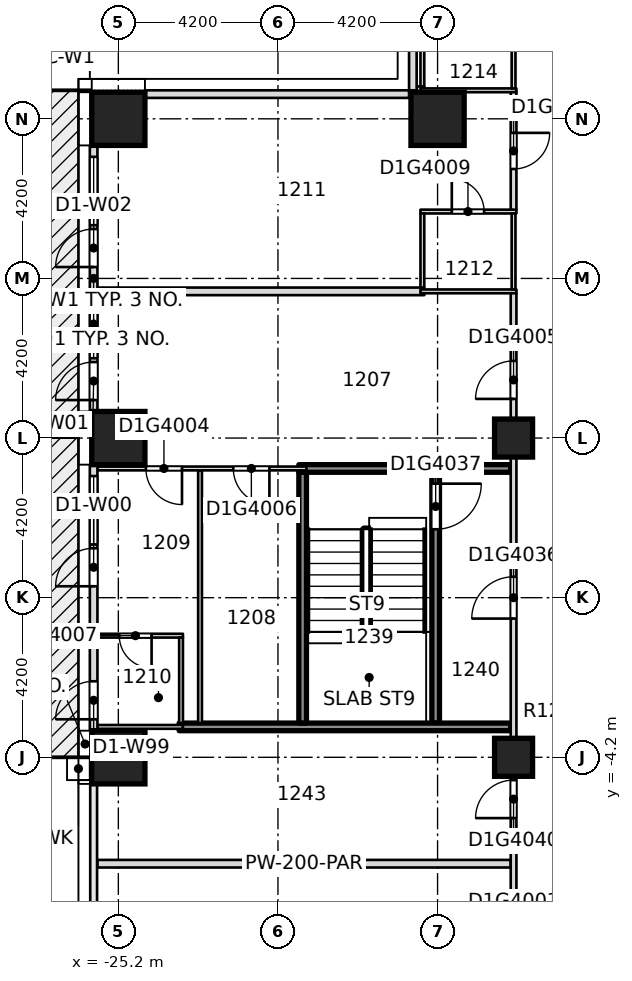
"""IFC4 building model, lengths in metres.
Left out: names, types, materials, properties, quantities, classifications, styles, units other than length and angle.
Written with IfcOpenShell. Run it as: python <this file> out.ifc"""

import sys

from ifc_helpers import new_model, si_unit, direction, frame, frame_2d, origin, origin_2d, place, context, subcontext, project, spatial, rectangle, extrude, element, fill, save


model = new_model("IFC4")
c1 = context("Model", 3, precision=1e-05, world=origin(), true_north=direction((0.0, 1.0)))
c2 = subcontext(c1, "Body", "Model", "MODEL_VIEW")
j1 = project(units=[si_unit("LENGTHUNIT", "METRE"), si_unit("PLANEANGLEUNIT", "RADIAN")], contexts=[c1])
p1 = place(None, origin())
s1 = spatial("IfcSite", under=j1, at=p1, CompositionType="ELEMENT")
p2 = place(p1, origin())
s2 = spatial("IfcBuilding", under=s1, at=p2, CompositionType="ELEMENT")
p3 = place(p2, frame((0.0, 0.0, 55.2)))
s3 = spatial("IfcBuildingStorey", under=s2, at=p3, CompositionType="ELEMENT", Elevation=55.2)
for number, where, z_axis, x_axis in (
    (1, (-25.2, -4.2, -0.32), (0.0, 0.0, 1.0), (1.0, 0.0, 0.0)),
    (2, (-25.2, 4.2, -0.32), (0.0, 0.0, 1.0), (1.0, 0.0, 0.0)),
    (3, (-25.2, 12.6, -0.32), (0.0, 0.0, 1.0), (1.0, 0.0, 0.0)),
    (4, (-16.8, 12.6, -0.32), (0.0, 0.0, 1.0), (1.0, 0.0, 0.0)),
):
    element("IfcColumn", number, at=place(p3, frame(where, z_axis=z_axis, x_axis=x_axis)), inside=s3, PredefinedType="COLUMN", context=c2, shape_type="SweptSolid", body=[
        extrude(rectangle(XDim=1.4, YDim=1.4, at=origin_2d()), origin(), (0.0, 0.0, 1.0), 3.45),
    ])
for number, where, z_axis, x_axis in (
    (5, (-14.8, -4.2, -0.32), (0.0, 0.0, 1.0), (1.0, 0.0, 0.0)),
    (6, (-14.8, 4.2, -0.32), (0.0, 0.0, 1.0), (1.0, 0.0, 0.0)),
):
    element("IfcColumn", number, at=place(p3, frame(where, z_axis=z_axis, x_axis=x_axis)), inside=s3, PredefinedType="COLUMN", context=c2, shape_type="SweptSolid", body=[
        extrude(rectangle(XDim=1.0, YDim=1.0, at=origin_2d()), origin(), (0.0, 0.0, 1.0), 3.45),
    ])
p4 = place(p3, frame((-25.75, -7.0, 0.0), z_axis=(0.0, 0.0, 1.0), x_axis=(1.0, 0.0, 0.0)))
e7 = element("IfcWall", 7, at=p4, inside=s3, PredefinedType="PARTITIONING", context=c2, shape_type="SweptSolid", body=[
    extrude(rectangle(XDim=10.875, YDim=0.2, at=frame_2d((5.438, 0.0))), origin(), (0.0, 0.0, 1.0), 3.13),
])
p5 = place(p3, frame((-25.75, -3.4, 0.0), z_axis=(0.0, 0.0, 1.0), x_axis=(1.0, 0.0, 0.0)))
e8 = element("IfcWall", 8, at=p5, inside=s3, PredefinedType="PARTITIONING", context=c2, shape_type="SweptSolid", body=[
    extrude(rectangle(XDim=2.25, YDim=0.1, at=frame_2d((1.125, 0.0))), origin(), (0.0, 0.0, 1.0), 3.13),
])
p6 = place(p3, frame((-25.75, -1.0, 0.0), z_axis=(0.0, 0.0, 1.0), x_axis=(1.0, 0.0, 0.0)))
e9 = element("IfcWall", 9, at=p6, inside=s3, PredefinedType="PARTITIONING", context=c2, shape_type="SweptSolid", body=[
    extrude(rectangle(XDim=2.25, YDim=0.1, at=frame_2d((1.125, 0.0))), origin(), (0.0, 0.0, 1.0), 3.13),
])
p7 = place(p6, frame((0.575, 0.0, 0.0)))
e10 = element("IfcOpeningElement", 10, at=p7, cuts=e9, PredefinedType="OPENING", context=c2, shape_type="SweptSolid", body=[
    extrude(rectangle(XDim=0.85, YDim=2.1, at=frame_2d((0.425, 1.05))), frame((0.0, 0.06, 0.0), z_axis=(0.0, -1.0, 0.0), x_axis=(1.0, 0.0, 0.0)), (0.0, 0.0, 1.0), 0.12),
])
p8 = place(p3, frame((-25.75, 3.4, 0.0), z_axis=(0.0, 0.0, 1.0), x_axis=(1.0, 0.0, 0.0)))
e11 = element("IfcWall", 11, at=p8, inside=s3, PredefinedType="PARTITIONING", context=c2, shape_type="SweptSolid", body=[
    extrude(rectangle(XDim=5.5, YDim=0.1, at=frame_2d((2.75, 0.0))), origin(), (0.0, 0.0, 1.0), 3.13),
])
p9 = place(p8, frame((1.275, 0.0, 0.0)))
e12 = element("IfcOpeningElement", 12, at=p9, cuts=e11, PredefinedType="OPENING", context=c2, shape_type="SweptSolid", body=[
    extrude(rectangle(XDim=0.95, YDim=2.1, at=frame_2d((0.475, 1.05))), frame((0.0, 0.06, 0.0), z_axis=(0.0, -1.0, 0.0), x_axis=(1.0, 0.0, 0.0)), (0.0, 0.0, 1.0), 0.12),
])
p10 = place(p8, frame((3.575, 0.0, 0.0)))
e13 = element("IfcOpeningElement", 13, at=p10, cuts=e11, PredefinedType="OPENING", context=c2, shape_type="SweptSolid", body=[
    extrude(rectangle(XDim=0.95, YDim=2.1, at=frame_2d((0.475, 1.05))), frame((0.0, 0.06, 0.0), z_axis=(0.0, -1.0, 0.0), x_axis=(1.0, 0.0, 0.0)), (0.0, 0.0, 1.0), 0.12),
])
p11 = place(p3, frame((-20.45, 3.4, 0.0), z_axis=(0.0, 0.0, 1.0), x_axis=(1.0, 0.0, 0.0)))
e14 = element("IfcWall", 14, at=p11, inside=s3, PredefinedType="SOLIDWALL", context=c2, shape_type="SweptSolid", body=[
    extrude(rectangle(XDim=5.575, YDim=0.2, at=frame_2d((2.788, 0.0))), origin(), (0.0, 0.0, 1.0), 3.13),
])
p12 = place(p3, frame((-25.75, 8.06, 0.0), z_axis=(0.0, 0.0, 1.0), x_axis=(1.0, 0.0, 0.0)))
e15 = element("IfcWall", 15, at=p12, inside=s3, PredefinedType="PARTITIONING", context=c2, shape_type="SweptSolid", body=[
    extrude(rectangle(XDim=8.6, YDim=0.2, at=frame_2d((4.3, 0.0))), origin(), (0.0, 0.0, 1.0), 3.13),
])
p13 = place(p3, frame((-17.25, 8.06, 0.0), z_axis=(0.0, 0.0, 1.0), x_axis=(1.0, 0.0, 0.0)))
e16 = element("IfcWall", 16, at=p13, inside=s3, PredefinedType="PARTITIONING", context=c2, shape_type="SweptSolid", body=[
    extrude(rectangle(XDim=2.525, YDim=0.1, at=frame_2d((1.262, 0.0))), origin(), (0.0, 0.0, 1.0), 3.13),
])
p14 = place(p3, frame((-17.25, 10.16, 0.0), z_axis=(0.0, 0.0, 1.0), x_axis=(1.0, 0.0, 0.0)))
e17 = element("IfcWall", 17, at=p14, inside=s3, PredefinedType="PARTITIONING", context=c2, shape_type="SweptSolid", body=[
    extrude(rectangle(XDim=2.525, YDim=0.1, at=frame_2d((1.262, 0.0))), origin(), (0.0, 0.0, 1.0), 3.13),
])
p15 = place(p14, frame((0.825, 0.0, 0.0)))
e18 = element("IfcOpeningElement", 18, at=p15, cuts=e17, PredefinedType="OPENING", context=c2, shape_type="SweptSolid", body=[
    extrude(rectangle(XDim=0.85, YDim=2.1, at=frame_2d((0.425, 1.05))), frame((0.0, 0.06, 0.0), z_axis=(0.0, -1.0, 0.0), x_axis=(1.0, 0.0, 0.0)), (0.0, 0.0, 1.0), 0.12),
])
p16 = place(p3, frame((-17.35, 13.35, 0.0), z_axis=(0.0, 0.0, 1.0), x_axis=(1.0, 0.0, 0.0)))
e19 = element("IfcWall", 19, at=p16, inside=s3, PredefinedType="PARTITIONING", context=c2, shape_type="SweptSolid", body=[
    extrude(rectangle(XDim=0.2, YDim=0.2, at=frame_2d((0.1, 0.0))), origin(), (0.0, 0.0, 1.0), 3.13),
])
p17 = place(p3, frame((-17.25, 13.35, 0.0), z_axis=(0.0, 0.0, 1.0), x_axis=(1.0, 0.0, 0.0)))
e20 = element("IfcWall", 20, at=p17, inside=s3, PredefinedType="PARTITIONING", context=c2, shape_type="SweptSolid", body=[
    extrude(rectangle(XDim=2.525, YDim=0.1, at=frame_2d((1.262, 0.0))), origin(), (0.0, 0.0, 1.0), 3.13),
])
p18 = place(p3, frame((-23.55, -3.3, 0.0), z_axis=(0.0, 0.0, 1.0), x_axis=(0.0, 1.0, 0.0)))
e21 = element("IfcWall", 21, at=p18, inside=s3, PredefinedType="PARTITIONING", context=c2, shape_type="SweptSolid", body=[
    extrude(rectangle(XDim=2.25, YDim=0.1, at=frame_2d((1.125, 0.0))), origin(), (0.0, 0.0, 1.0), 3.13),
])
p19 = place(p3, frame((-23.05, -3.3, 0.0), z_axis=(0.0, 0.0, 1.0), x_axis=(0.0, 1.0, 0.0)))
e22 = element("IfcWall", 22, at=p19, inside=s3, PredefinedType="PARTITIONING", context=c2, shape_type="SweptSolid", body=[
    extrude(rectangle(XDim=6.65, YDim=0.1, at=frame_2d((3.325, 0.0))), origin(), (0.0, 0.0, 1.0), 3.13),
])
p20 = place(p3, frame((-17.2, 8.16, 0.0), z_axis=(0.0, 0.0, 1.0), x_axis=(0.0, 1.0, 0.0)))
e23 = element("IfcWall", 23, at=p20, inside=s3, PredefinedType="PARTITIONING", context=c2, shape_type="SweptSolid", body=[
    extrude(rectangle(XDim=1.95, YDim=0.1, at=frame_2d((0.975, 0.0))), origin(), (0.0, 0.0, 1.0), 3.13),
])
p21 = place(p3, frame((-17.2, 13.45, 0.0), z_axis=(0.0, 0.0, 1.0), x_axis=(0.0, 1.0, 0.0)))
e24 = element("IfcWall", 24, at=p21, inside=s3, PredefinedType="PARTITIONING", context=c2, shape_type="SweptSolid", body=[
    extrude(rectangle(XDim=1.65, YDim=0.1, at=frame_2d((0.825, 0.0))), origin(), (0.0, 0.0, 1.0), 3.13),
])
p22 = place(p3, frame((-16.85, -3.3, 0.0), z_axis=(0.0, 0.0, 1.0), x_axis=(0.0, 1.0, 0.0)))
e25 = element("IfcWall", 25, at=p22, inside=s3, PredefinedType="SOLIDWALL", context=c2, shape_type="SweptSolid", body=[
    extrude(rectangle(XDim=6.6, YDim=0.2, at=frame_2d((3.3, 0.0))), origin(), (0.0, 0.0, 1.0), 3.13),
])
p23 = place(p22, frame((5.1, 0.0, 0.0)))
e26 = element("IfcOpeningElement", 26, at=p23, cuts=e25, PredefinedType="OPENING", context=c2, shape_type="SweptSolid", body=[
    extrude(rectangle(XDim=1.2, YDim=2.1, at=frame_2d((0.6, 1.05))), frame((0.0, 0.11, 0.0), z_axis=(0.0, -1.0, 0.0), x_axis=(1.0, 0.0, 0.0)), (0.0, 0.0, 1.0), 0.22),
])
p24 = place(p3, frame((-14.8, -10.525, 0.0), z_axis=(0.0, 0.0, 1.0), x_axis=(0.0, 1.0, 0.0)))
e27 = element("IfcWall", 27, at=p24, inside=s3, PredefinedType="PARTITIONING", context=c2, shape_type="SweptSolid", body=[
    extrude(rectangle(XDim=18.535, YDim=0.15, at=frame_2d((9.268, 0.0))), origin(), (0.0, 0.0, 1.0), 3.13),
])
p25 = place(p24, frame((0.925, 0.0, 0.0)))
e28 = element("IfcOpeningElement", 28, at=p25, cuts=e27, PredefinedType="OPENING", context=c2, shape_type="SweptSolid", body=[
    extrude(rectangle(XDim=1.0, YDim=2.1, at=frame_2d((0.5, 1.05))), frame((0.0, 0.085, 0.0), z_axis=(0.0, -1.0, 0.0), x_axis=(1.0, 0.0, 0.0)), (0.0, 0.0, 1.0), 0.17),
])
p26 = place(p24, frame((15.755, 0.0, 0.0)))
e29 = element("IfcOpeningElement", 29, at=p26, cuts=e27, PredefinedType="OPENING", context=c2, shape_type="SweptSolid", body=[
    extrude(rectangle(XDim=1.0, YDim=2.1, at=frame_2d((0.5, 1.05))), frame((0.0, 0.085, 0.0), z_axis=(0.0, -1.0, 0.0), x_axis=(1.0, 0.0, 0.0)), (0.0, 0.0, 1.0), 0.17),
])
p27 = place(p24, frame((9.975, 0.0, 0.0)))
e30 = element("IfcOpeningElement", 30, at=p27, cuts=e27, PredefinedType="OPENING", context=c2, shape_type="SweptSolid", body=[
    extrude(rectangle(XDim=1.1, YDim=2.1, at=frame_2d((0.55, 1.05))), frame((0.0, 0.085, 0.0), z_axis=(0.0, -1.0, 0.0), x_axis=(1.0, 0.0, 0.0)), (0.0, 0.0, 1.0), 0.17),
])
p28 = place(p24, frame((4.725, 0.0, 0.0)))
e31 = element("IfcOpeningElement", 31, at=p28, cuts=e27, PredefinedType="OPENING", context=c2, shape_type="SweptSolid", body=[
    extrude(rectangle(XDim=1.0, YDim=2.1, at=frame_2d((0.5, 1.05))), frame((0.0, 0.085, 0.0), z_axis=(0.0, -1.0, 0.0), x_axis=(1.0, 0.0, 0.0)), (0.0, 0.0, 1.0), 0.17),
])
p29 = place(p3, frame((-14.8, 8.11, 0.0), z_axis=(0.0, 0.0, 1.0), x_axis=(0.0, 1.0, 0.0)))
e32 = element("IfcWall", 32, at=p29, inside=s3, PredefinedType="PARTITIONING", context=c2, shape_type="SweptSolid", body=[
    extrude(rectangle(XDim=2.0, YDim=0.1, at=frame_2d((1.0, 0.0))), origin(), (0.0, 0.0, 1.0), 3.13),
])
p30 = place(p3, frame((-14.8, 10.21, 0.0), z_axis=(0.0, 0.0, 1.0), x_axis=(0.0, 1.0, 0.0)))
e33 = element("IfcWall", 33, at=p30, inside=s3, PredefinedType="PARTITIONING", context=c2, shape_type="SweptSolid", body=[
    extrude(rectangle(XDim=3.09, YDim=0.15, at=frame_2d((1.545, 0.0))), origin(), (0.0, 0.0, 1.0), 3.13),
])
p31 = place(p30, frame((1.07, 0.0, 0.0)))
e34 = element("IfcOpeningElement", 34, at=p31, cuts=e33, PredefinedType="OPENING", context=c2, shape_type="SweptSolid", body=[
    extrude(rectangle(XDim=0.95, YDim=2.1, at=frame_2d((0.475, 1.05))), frame((0.0, 0.085, 0.0), z_axis=(0.0, -1.0, 0.0), x_axis=(1.0, 0.0, 0.0)), (0.0, 0.0, 1.0), 0.17),
])
p32 = place(p3, frame((-14.8, 13.4, 0.0), z_axis=(0.0, 0.0, 1.0), x_axis=(0.0, 1.0, 0.0)))
e35 = element("IfcWall", 35, at=p32, inside=s3, PredefinedType="PARTITIONING", context=c2, shape_type="SweptSolid", body=[
    extrude(rectangle(XDim=1.7, YDim=0.1, at=frame_2d((0.85, 0.0))), origin(), (0.0, 0.0, 1.0), 3.13),
])
p33 = place(p3, frame((-17.45, 20.3, 0.0), z_axis=(0.0, 0.0, 1.0), x_axis=(0.0, -1.0, 0.0)))
e36 = element("IfcWall", 36, at=p33, inside=s3, PredefinedType="STANDARD", context=c2, shape_type="SweptSolid", body=[
    extrude(rectangle(XDim=6.95, YDim=0.2, at=frame_2d((3.475, 0.0))), origin(), (0.0, 0.0, 1.0), 3.13),
])
p34 = place(p33, frame((3.775, 0.0, 0.2)))
e37 = element("IfcOpeningElement", 37, at=p34, cuts=e36, PredefinedType="OPENING", context=c2, shape_type="SweptSolid", body=[
    extrude(rectangle(XDim=1.8, YDim=2.65, at=frame_2d((0.9, 1.325))), frame((0.0, 0.11, 0.0), z_axis=(0.0, -1.0, 0.0), x_axis=(1.0, 0.0, 0.0)), (0.0, 0.0, 1.0), 0.22),
])
p35 = place(p33, frame((0.3, 0.0, 0.2)))
e38 = element("IfcOpeningElement", 38, at=p35, cuts=e36, PredefinedType="OPENING", context=c2, shape_type="SweptSolid", body=[
    extrude(rectangle(XDim=1.8, YDim=2.65, at=frame_2d((0.9, 1.325))), frame((0.0, 0.11, 0.0), z_axis=(0.0, -1.0, 0.0), x_axis=(1.0, 0.0, 0.0)), (0.0, 0.0, 1.0), 0.22),
])
p36 = place(p3, frame((-17.55, 13.25, 0.0), z_axis=(0.0, 0.0, 1.0), x_axis=(-1.0, 0.0, 0.0)))
e39 = element("IfcWall", 39, at=p36, inside=s3, PredefinedType="STANDARD", context=c2, shape_type="SweptSolid", body=[
    extrude(rectangle(XDim=6.95, YDim=0.2, at=frame_2d((3.475, 0.0))), origin(), (0.0, 0.0, 1.0), 3.13),
])
p37 = place(p3, frame((-25.85, 11.9, 0.0), z_axis=(0.0, 0.0, 1.0), x_axis=(0.0, -1.0, 0.0)))
e40 = element("IfcWall", 40, at=p37, inside=s3, PredefinedType="STANDARD", context=c2, shape_type="SweptSolid", body=[
    extrude(rectangle(XDim=7.0, YDim=0.2, at=frame_2d((3.5, 0.0))), origin(), (0.0, 0.0, 1.0), 3.13),
])
p38 = place(p37, frame((3.8, 0.0, 0.2)))
e41 = element("IfcOpeningElement", 41, at=p38, cuts=e40, PredefinedType="OPENING", context=c2, shape_type="SweptSolid", body=[
    extrude(rectangle(XDim=1.8, YDim=2.65, at=frame_2d((0.9, 1.325))), frame((0.0, 0.11, 0.0), z_axis=(0.0, -1.0, 0.0), x_axis=(1.0, 0.0, 0.0)), (0.0, 0.0, 1.0), 0.22),
])
p39 = place(p37, frame((5.7, 0.0, 0.0)))
e42 = element("IfcOpeningElement", 42, at=p39, cuts=e40, PredefinedType="OPENING", context=c2, shape_type="SweptSolid", body=[
    extrude(rectangle(XDim=1.0, YDim=2.4, at=frame_2d((0.5, 1.2))), frame((0.0, 0.11, 0.0), z_axis=(0.0, -1.0, 0.0), x_axis=(1.0, 0.0, 0.0)), (0.0, 0.0, 1.0), 0.22),
])
p40 = place(p37, frame((0.3, 0.0, 0.2)))
e43 = element("IfcOpeningElement", 43, at=p40, cuts=e40, PredefinedType="OPENING", context=c2, shape_type="SweptSolid", body=[
    extrude(rectangle(XDim=1.8, YDim=2.65, at=frame_2d((0.9, 1.325))), frame((0.0, 0.11, 0.0), z_axis=(0.0, -1.0, 0.0), x_axis=(1.0, 0.0, 0.0)), (0.0, 0.0, 1.0), 0.22),
])
p41 = place(p37, frame((2.2, 0.0, 0.0)))
e44 = element("IfcOpeningElement", 44, at=p41, cuts=e40, PredefinedType="OPENING", context=c2, shape_type="SweptSolid", body=[
    extrude(rectangle(XDim=1.0, YDim=2.4, at=frame_2d((0.5, 1.2))), frame((0.0, 0.11, 0.0), z_axis=(0.0, -1.0, 0.0), x_axis=(1.0, 0.0, 0.0)), (0.0, 0.0, 1.0), 0.22),
])
p42 = place(p3, frame((-25.85, 3.5, 0.0), z_axis=(0.0, 0.0, 1.0), x_axis=(0.0, -1.0, 0.0)))
e45 = element("IfcWall", 45, at=p42, inside=s3, PredefinedType="STANDARD", context=c2, shape_type="SweptSolid", body=[
    extrude(rectangle(XDim=7.0, YDim=0.2, at=frame_2d((3.5, 0.0))), origin(), (0.0, 0.0, 1.0), 3.13),
])
p43 = place(p42, frame((5.7, 0.0, 0.0)))
e46 = element("IfcOpeningElement", 46, at=p43, cuts=e45, PredefinedType="OPENING", context=c2, shape_type="SweptSolid", body=[
    extrude(rectangle(XDim=1.0, YDim=2.4, at=frame_2d((0.5, 1.2))), frame((0.0, 0.11, 0.0), z_axis=(0.0, -1.0, 0.0), x_axis=(1.0, 0.0, 0.0)), (0.0, 0.0, 1.0), 0.22),
])
p44 = place(p42, frame((0.3, 0.0, 0.2)))
e47 = element("IfcOpeningElement", 47, at=p44, cuts=e45, PredefinedType="OPENING", context=c2, shape_type="SweptSolid", body=[
    extrude(rectangle(XDim=1.8, YDim=2.65, at=frame_2d((0.9, 1.325))), frame((0.0, 0.11, 0.0), z_axis=(0.0, -1.0, 0.0), x_axis=(1.0, 0.0, 0.0)), (0.0, 0.0, 1.0), 0.22),
])
p45 = place(p42, frame((2.2, 0.0, 0.0)))
e48 = element("IfcOpeningElement", 48, at=p45, cuts=e45, PredefinedType="OPENING", context=c2, shape_type="SweptSolid", body=[
    extrude(rectangle(XDim=1.0, YDim=2.4, at=frame_2d((0.5, 1.2))), frame((0.0, 0.11, 0.0), z_axis=(0.0, -1.0, 0.0), x_axis=(1.0, 0.0, 0.0)), (0.0, 0.0, 1.0), 0.22),
])
p46 = place(p3, frame((-23.6, -3.4, 0.0), z_axis=(0.0, 0.0, 1.0), x_axis=(1.0, 0.0, 0.0)))
e49 = element("IfcWall", 49, at=p46, inside=s3, PredefinedType="SOLIDWALL", context=c2, shape_type="SweptSolid", body=[
    extrude(rectangle(XDim=8.725, YDim=0.2, at=frame_2d((4.363, 0.0))), origin(), (0.0, 0.0, 1.0), 3.13),
])
p47 = place(p3, frame((-20.35, -3.3, 0.0), z_axis=(0.0, 0.0, 1.0), x_axis=(0.0, 1.0, 0.0)))
e50 = element("IfcWall", 50, at=p47, inside=s3, PredefinedType="SOLIDWALL", context=c2, shape_type="SweptSolid", body=[
    extrude(rectangle(XDim=6.6, YDim=0.2, at=frame_2d((3.3, 0.0))), origin(), (0.0, 0.0, 1.0), 3.13),
])
p48 = place(p9, origin())
e51 = element("IfcDoor", 51, at=p48, inside=s3, OperationType="SINGLE_SWING_RIGHT", PredefinedType="DOOR", context=c2, shape_type="SweptSolid", body=[
    extrude(rectangle(XDim=0.95, YDim=2.1, at=frame_2d((0.475, 1.05))), frame((0.0, 0.025, 0.0), z_axis=(0.0, -1.0, 0.0), x_axis=(1.0, 0.0, 0.0)), (0.0, 0.0, 1.0), 0.05),
])
fill(e12, e51)
p49 = place(p26, origin())
e52 = element("IfcDoor", 52, at=p49, inside=s3, OperationType="SINGLE_SWING_RIGHT", PredefinedType="DOOR", context=c2, shape_type="SweptSolid", body=[
    extrude(rectangle(XDim=1.0, YDim=2.1, at=frame_2d((0.5, 1.05))), frame((0.0, 0.025, 0.0), z_axis=(0.0, -1.0, 0.0), x_axis=(1.0, 0.0, 0.0)), (0.0, 0.0, 1.0), 0.05),
])
fill(e29, e52)
p50 = place(p10, origin())
e53 = element("IfcDoor", 53, at=p50, inside=s3, OperationType="SINGLE_SWING_RIGHT", PredefinedType="DOOR", context=c2, shape_type="SweptSolid", body=[
    extrude(rectangle(XDim=0.95, YDim=2.1, at=frame_2d((0.475, 1.05))), frame((0.0, 0.025, 0.0), z_axis=(0.0, -1.0, 0.0), x_axis=(1.0, 0.0, 0.0)), (0.0, 0.0, 1.0), 0.05),
])
fill(e13, e53)
p51 = place(p7, origin())
e54 = element("IfcDoor", 54, at=p51, inside=s3, OperationType="SINGLE_SWING_RIGHT", PredefinedType="DOOR", context=c2, shape_type="SweptSolid", body=[
    extrude(rectangle(XDim=0.85, YDim=2.1, at=frame_2d((0.425, 1.05))), frame((0.0, 0.025, 0.0), z_axis=(0.0, -1.0, 0.0), x_axis=(1.0, 0.0, 0.0)), (0.0, 0.0, 1.0), 0.05),
])
fill(e10, e54)
p52 = place(p31, origin())
e55 = element("IfcDoor", 55, at=p52, inside=s3, OperationType="SINGLE_SWING_LEFT", PredefinedType="DOOR", context=c2, shape_type="SweptSolid", body=[
    extrude(rectangle(XDim=0.95, YDim=2.1, at=frame_2d((0.475, 1.05))), frame((0.0, 0.025, 0.0), z_axis=(0.0, -1.0, 0.0), x_axis=(1.0, 0.0, 0.0)), (0.0, 0.0, 1.0), 0.05),
])
fill(e34, e55)
p53 = place(p15, origin())
e56 = element("IfcDoor", 56, at=p53, inside=s3, OperationType="SINGLE_SWING_RIGHT", PredefinedType="DOOR", context=c2, shape_type="SweptSolid", body=[
    extrude(rectangle(XDim=0.85, YDim=2.1, at=frame_2d((0.425, 1.05))), frame((0.0, 0.025, 0.0), z_axis=(0.0, -1.0, 0.0), x_axis=(1.0, 0.0, 0.0)), (0.0, 0.0, 1.0), 0.05),
])
fill(e18, e56)
p54 = place(p27, origin())
e57 = element("IfcDoor", 57, at=p54, inside=s3, OperationType="SINGLE_SWING_RIGHT", PredefinedType="DOOR", context=c2, shape_type="SweptSolid", body=[
    extrude(rectangle(XDim=1.1, YDim=2.1, at=frame_2d((0.55, 1.05))), frame((0.0, 0.025, 0.0), z_axis=(0.0, -1.0, 0.0), x_axis=(1.0, 0.0, 0.0)), (0.0, 0.0, 1.0), 0.05),
])
fill(e30, e57)
p55 = place(p23, origin())
e58 = element("IfcDoor", 58, at=p55, inside=s3, OperationType="SINGLE_SWING_RIGHT", PredefinedType="DOOR", context=c2, shape_type="SweptSolid", body=[
    extrude(rectangle(XDim=1.2, YDim=2.1, at=frame_2d((0.6, 1.05))), frame((0.0, 0.025, 0.0), z_axis=(0.0, -1.0, 0.0), x_axis=(1.0, 0.0, 0.0)), (0.0, 0.0, 1.0), 0.05),
])
fill(e26, e58)
p56 = place(p28, origin())
e59 = element("IfcDoor", 59, at=p56, inside=s3, OperationType="SINGLE_SWING_LEFT", PredefinedType="DOOR", context=c2, shape_type="SweptSolid", body=[
    extrude(rectangle(XDim=1.0, YDim=2.1, at=frame_2d((0.5, 1.05))), frame((0.0, 0.025, 0.0), z_axis=(0.0, -1.0, 0.0), x_axis=(1.0, 0.0, 0.0)), (0.0, 0.0, 1.0), 0.05),
])
fill(e31, e59)
p57 = place(p38, origin())
e60 = element("IfcWindow", 60, at=p57, inside=s3, PartitioningType="SINGLE_PANEL", PredefinedType="WINDOW", context=c2, shape_type="SweptSolid", body=[
    extrude(rectangle(XDim=1.8, YDim=2.65, at=frame_2d((0.9, 1.325))), frame((0.0, 0.03, 0.0), z_axis=(0.0, -1.0, 0.0), x_axis=(1.0, 0.0, 0.0)), (0.0, 0.0, 1.0), 0.06),
])
fill(e41, e60)
p58 = place(p39, origin())
e61 = element("IfcDoor", 61, at=p58, inside=s3, OperationType="SINGLE_SWING_LEFT", PredefinedType="DOOR", context=c2, shape_type="SweptSolid", body=[
    extrude(rectangle(XDim=1.0, YDim=2.4, at=frame_2d((0.5, 1.2))), frame((0.0, 0.025, 0.0), z_axis=(0.0, -1.0, 0.0), x_axis=(1.0, 0.0, 0.0)), (0.0, 0.0, 1.0), 0.05),
])
fill(e42, e61)
p59 = place(p40, origin())
e62 = element("IfcWindow", 62, at=p59, inside=s3, PartitioningType="SINGLE_PANEL", PredefinedType="WINDOW", context=c2, shape_type="SweptSolid", body=[
    extrude(rectangle(XDim=1.8, YDim=2.65, at=frame_2d((0.9, 1.325))), frame((0.0, 0.03, 0.0), z_axis=(0.0, -1.0, 0.0), x_axis=(1.0, 0.0, 0.0)), (0.0, 0.0, 1.0), 0.06),
])
fill(e43, e62)
p60 = place(p41, origin())
e63 = element("IfcDoor", 63, at=p60, inside=s3, OperationType="SINGLE_SWING_LEFT", PredefinedType="DOOR", context=c2, shape_type="SweptSolid", body=[
    extrude(rectangle(XDim=1.0, YDim=2.4, at=frame_2d((0.5, 1.2))), frame((0.0, 0.025, 0.0), z_axis=(0.0, -1.0, 0.0), x_axis=(1.0, 0.0, 0.0)), (0.0, 0.0, 1.0), 0.05),
])
fill(e44, e63)
p61 = place(p43, origin())
e64 = element("IfcDoor", 64, at=p61, inside=s3, OperationType="SINGLE_SWING_LEFT", PredefinedType="DOOR", context=c2, shape_type="SweptSolid", body=[
    extrude(rectangle(XDim=1.0, YDim=2.4, at=frame_2d((0.5, 1.2))), frame((0.0, 0.025, 0.0), z_axis=(0.0, -1.0, 0.0), x_axis=(1.0, 0.0, 0.0)), (0.0, 0.0, 1.0), 0.05),
])
fill(e46, e64)
p62 = place(p44, origin())
e65 = element("IfcWindow", 65, at=p62, inside=s3, PartitioningType="SINGLE_PANEL", PredefinedType="WINDOW", context=c2, shape_type="SweptSolid", body=[
    extrude(rectangle(XDim=1.8, YDim=2.65, at=frame_2d((0.9, 1.325))), frame((0.0, 0.03, 0.0), z_axis=(0.0, -1.0, 0.0), x_axis=(1.0, 0.0, 0.0)), (0.0, 0.0, 1.0), 0.06),
])
fill(e47, e65)
p63 = place(p45, origin())
e66 = element("IfcDoor", 66, at=p63, inside=s3, OperationType="SINGLE_SWING_LEFT", PredefinedType="DOOR", context=c2, shape_type="SweptSolid", body=[
    extrude(rectangle(XDim=1.0, YDim=2.4, at=frame_2d((0.5, 1.2))), frame((0.0, 0.025, 0.0), z_axis=(0.0, -1.0, 0.0), x_axis=(1.0, 0.0, 0.0)), (0.0, 0.0, 1.0), 0.05),
])
fill(e48, e66)
save(model, sys.argv[1])
